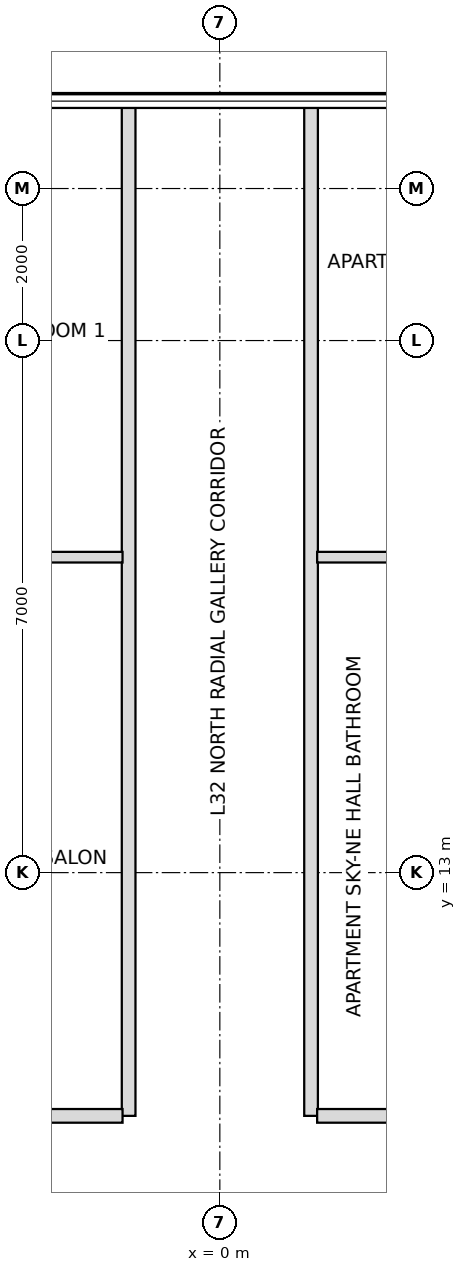
"""IFC4 building model, lengths in metres.
Left out: names, types, materials, properties, quantities, classifications, styles, units other than length and angle.
Written with IfcOpenShell. Run it as: python <this file> out.ifc"""

import sys

from ifc_helpers import new_model, si_unit, direction, frame, frame_2d, origin, place, context, subcontext, project, spatial, rectangle, extrude, element, save


model = new_model("IFC4")
c1 = context("Model", 3, precision=1e-05, world=origin(), true_north=direction((0.0, 1.0)))
c2 = subcontext(c1, "Body", "Model", "MODEL_VIEW")
j1 = project(units=[si_unit("LENGTHUNIT", "METRE"), si_unit("PLANEANGLEUNIT", "RADIAN")], contexts=[c1])
p1 = place(None, origin())
s1 = spatial("IfcSite", under=j1, at=p1, CompositionType="ELEMENT")
p2 = place(p1, origin())
s2 = spatial("IfcBuilding", under=s1, at=p2, CompositionType="ELEMENT")
p3 = place(p2, frame((0.0, 0.0, 129.6)))
s3 = spatial("IfcBuildingStorey", under=s2, at=p3, CompositionType="ELEMENT", Elevation=129.6)
for number, where, z_axis, x_axis in (
    (1, (-1.2, 9.8, 0.0), (0.0, 0.0, 1.0), (0.0, 1.0, 0.0)),
    (2, (1.2, 9.8, 0.0), (0.0, 0.0, 1.0), (0.0, 1.0, 0.0)),
):
    element("IfcWall", number, at=place(p3, frame(where, z_axis=z_axis, x_axis=x_axis)), inside=s3, PredefinedType="PARTITIONING", context=c2, shape_type="SweptSolid", body=[
        extrude(rectangle(XDim=13.35, YDim=0.18, at=frame_2d((6.675, 0.0))), origin(), (0.0, 0.0, 1.0), 2.816),
    ])
p4 = place(p3, frame((-6.22, 9.8, 0.0), z_axis=(0.0, 0.0, 1.0), x_axis=(1.0, 0.0, 0.0)))
e3 = element("IfcWall", 3, at=p4, inside=s3, PredefinedType="PARTITIONING", context=c2, shape_type="SweptSolid", body=[
    extrude(rectangle(XDim=4.94, YDim=0.18, at=frame_2d((2.47, 0.0))), origin(), (0.0, 0.0, 1.0), 3.38),
])
p5 = place(p3, frame((1.28, 9.8, 0.0), z_axis=(0.0, 0.0, 1.0), x_axis=(1.0, 0.0, 0.0)))
e4 = element("IfcWall", 4, at=p5, inside=s3, PredefinedType="PARTITIONING", context=c2, shape_type="SweptSolid", body=[
    extrude(rectangle(XDim=1.79, YDim=0.18, at=frame_2d((0.895, 0.0))), origin(), (0.0, 0.0, 1.0), 3.38),
])
p6 = place(p3, frame((-6.22, 17.15, 0.0), z_axis=(0.0, 0.0, 1.0), x_axis=(1.0, 0.0, 0.0)))
e5 = element("IfcWall", 5, at=p6, inside=s3, PredefinedType="PARTITIONING", context=c2, shape_type="SweptSolid", body=[
    extrude(rectangle(XDim=4.94, YDim=0.14, at=frame_2d((2.47, 0.0))), origin(), (0.0, 0.0, 1.0), 3.38),
])
p7 = place(p6, frame((1.995, 0.0, 0.0)))
e6 = element("IfcOpeningElement", 6, at=p7, cuts=e5, PredefinedType="OPENING", context=c2, shape_type="SweptSolid", body=[
    extrude(rectangle(XDim=0.95, YDim=2.1, at=frame_2d((0.475, 1.05))), frame((0.0, 0.08, 0.0), z_axis=(0.0, -1.0, 0.0), x_axis=(1.0, 0.0, 0.0)), (0.0, 0.0, 1.0), 0.16),
])
p8 = place(p3, frame((1.28, 17.15, 0.0), z_axis=(0.0, 0.0, 1.0), x_axis=(1.0, 0.0, 0.0)))
e7 = element("IfcWall", 7, at=p8, inside=s3, PredefinedType="PARTITIONING", context=c2, shape_type="SweptSolid", body=[
    extrude(rectangle(XDim=1.79, YDim=0.14, at=frame_2d((0.895, 0.0))), origin(), (0.0, 0.0, 1.0), 3.38),
])
save(model, sys.argv[1])
